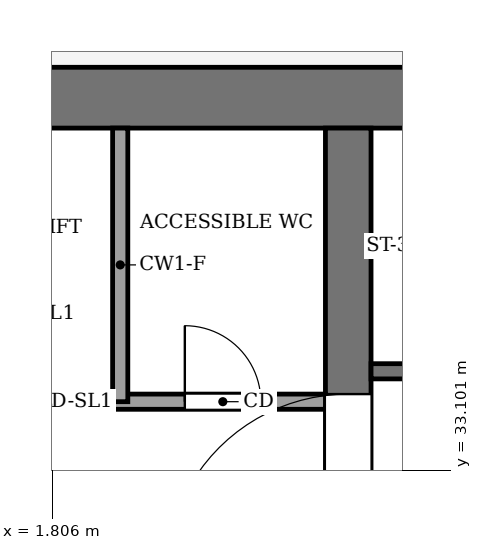
"""IFC4 building model, lengths in metres.
Left out: names, types, materials, properties, quantities, classifications, styles, units other than length and angle.
Written with IfcOpenShell. Run it as: python <this file> out.ifc"""

import sys

from ifc_helpers import new_model, si_unit, direction, frame, frame_2d, origin, place, context, subcontext, project, spatial, rectangle, extrude, element, fill, save


model = new_model("IFC4")
c1 = context("Model", 3, precision=1e-05, world=origin(), true_north=direction((0.0, 1.0)))
c2 = subcontext(c1, "Body", "Model", "MODEL_VIEW")
j1 = project(units=[si_unit("LENGTHUNIT", "METRE"), si_unit("PLANEANGLEUNIT", "RADIAN")], contexts=[c1])
p1 = place(None, origin())
s1 = spatial("IfcSite", under=j1, at=p1, CompositionType="ELEMENT")
p2 = place(p1, origin())
s2 = spatial("IfcBuilding", under=s1, at=p2, CompositionType="ELEMENT")
p3 = place(p2, frame((0.0, 0.0, 250.0)))
s3 = spatial("IfcBuildingStorey", under=s2, at=p3, CompositionType="ELEMENT", Elevation=250.0)
p4 = place(p3, frame((-13.4, 38.0, -0.13), z_axis=(0.0, 0.0, 1.0), x_axis=(1.0, 0.0, 0.0)))
e1 = element("IfcWall", 1, at=p4, inside=s3, PredefinedType="SHEAR", context=c2, shape_type="SweptSolid", body=[
    extrude(rectangle(XDim=26.8, YDim=0.8, at=frame_2d((13.4, 0.0))), origin(), (0.0, 0.0, 1.0), 4.0),
])
p5 = place(p3, frame((5.7, 18.4, -0.13), z_axis=(0.0, 0.0, 1.0), x_axis=(0.0, 1.0, 0.0)))
e2 = element("IfcWall", 2, at=p5, inside=s3, PredefinedType="SHEAR", context=c2, shape_type="SweptSolid", body=[
    extrude(rectangle(XDim=19.2, YDim=0.6, at=frame_2d((9.6, 0.0))), origin(), (0.0, 0.0, 1.0), 4.0),
])
p6 = place(p5, frame((13.3, 0.0, 0.13)))
e3 = element("IfcOpeningElement", 3, at=p6, cuts=e2, PredefinedType="OPENING", context=c2, shape_type="SweptSolid", body=[
    extrude(rectangle(XDim=2.4, YDim=2.4, at=frame_2d((1.2, 1.2))), frame((0.0, 0.31, 0.0), z_axis=(0.0, -1.0, 0.0), x_axis=(1.0, 0.0, 0.0)), (0.0, 0.0, 1.0), 0.62),
])
p7 = place(p3, frame((-5.4, 34.0, 0.0), z_axis=(0.0, 0.0, 1.0), x_axis=(1.0, 0.0, 0.0)))
e4 = element("IfcWall", 4, at=p7, inside=s3, PredefinedType="PARTITIONING", context=c2, shape_type="SweptSolid", body=[
    extrude(rectangle(XDim=10.8, YDim=0.2, at=frame_2d((5.4, 0.0))), origin(), (0.0, 0.0, 1.0), 3.87),
])
p8 = place(p7, frame((6.15, 0.0, 0.0)))
e5 = element("IfcOpeningElement", 5, at=p8, cuts=e4, PredefinedType="OPENING", context=c2, shape_type="SweptSolid", body=[
    extrude(rectangle(XDim=1.2, YDim=2.2, at=frame_2d((0.6, 1.1))), frame((0.0, 0.11, 0.0), z_axis=(0.0, -1.0, 0.0), x_axis=(1.0, 0.0, 0.0)), (0.0, 0.0, 1.0), 0.22),
])
p9 = place(p7, frame((8.95, 0.0, 0.0)))
e6 = element("IfcOpeningElement", 6, at=p9, cuts=e4, PredefinedType="OPENING", context=c2, shape_type="SweptSolid", body=[
    extrude(rectangle(XDim=1.0, YDim=2.1, at=frame_2d((0.5, 1.05))), frame((0.0, 0.11, 0.0), z_axis=(0.0, -1.0, 0.0), x_axis=(1.0, 0.0, 0.0)), (0.0, 0.0, 1.0), 0.22),
])
p10 = place(p3, frame((6.0, 34.4, 0.0), z_axis=(0.0, 0.0, 1.0), x_axis=(1.0, 0.0, 0.0)))
e7 = element("IfcWall", 7, at=p10, inside=s3, PredefinedType="PARTITIONING", context=c2, shape_type="SweptSolid", body=[
    extrude(rectangle(XDim=6.6, YDim=0.2, at=frame_2d((3.3, 0.0))), origin(), (0.0, 0.0, 1.0), 3.87),
])
p11 = place(p10, frame((4.8, 0.0, 0.0)))
e8 = element("IfcOpeningElement", 8, at=p11, cuts=e7, PredefinedType="OPENING", context=c2, shape_type="SweptSolid", body=[
    extrude(rectangle(XDim=1.2, YDim=2.2, at=frame_2d((0.6, 1.1))), frame((0.0, 0.11, 0.0), z_axis=(0.0, -1.0, 0.0), x_axis=(1.0, 0.0, 0.0)), (0.0, 0.0, 1.0), 0.22),
])
p12 = place(p3, frame((2.7, 34.0, 0.0), z_axis=(0.0, 0.0, 1.0), x_axis=(0.0, 1.0, 0.0)))
e9 = element("IfcWall", 9, at=p12, inside=s3, PredefinedType="PARTITIONING", context=c2, shape_type="SweptSolid", body=[
    extrude(rectangle(XDim=3.6, YDim=0.2, at=frame_2d((1.8, 0.0))), origin(), (0.0, 0.0, 1.0), 3.87),
])
p13 = place(p8, origin())
e10 = element("IfcDoor", 10, at=p13, inside=s3, OperationType="SLIDING_TO_LEFT", PredefinedType="DOOR", context=c2, shape_type="SweptSolid", body=[
    extrude(rectangle(XDim=1.2, YDim=2.2, at=frame_2d((0.6, 1.1))), frame((0.0, 0.025, 0.0), z_axis=(0.0, -1.0, 0.0), x_axis=(1.0, 0.0, 0.0)), (0.0, 0.0, 1.0), 0.05),
])
fill(e5, e10)
p14 = place(p9, origin())
e11 = element("IfcDoor", 11, at=p14, inside=s3, OperationType="SINGLE_SWING_LEFT", PredefinedType="DOOR", context=c2, shape_type="SweptSolid", body=[
    extrude(rectangle(XDim=1.0, YDim=2.1, at=frame_2d((0.5, 1.05))), frame((0.0, 0.025, 0.0), z_axis=(0.0, -1.0, 0.0), x_axis=(1.0, 0.0, 0.0)), (0.0, 0.0, 1.0), 0.05),
])
fill(e6, e11)
p15 = place(p6, origin())
e12 = element("IfcDoor", 12, at=p15, inside=s3, OperationType="DOUBLE_DOOR_SINGLE_SWING", PredefinedType="DOOR", context=c2, shape_type="SweptSolid", body=[
    extrude(rectangle(XDim=2.4, YDim=2.4, at=frame_2d((1.2, 1.2))), frame((0.0, 0.025, 0.0), z_axis=(0.0, -1.0, 0.0), x_axis=(1.0, 0.0, 0.0)), (0.0, 0.0, 1.0), 0.05),
])
fill(e3, e12)
save(model, sys.argv[1])
